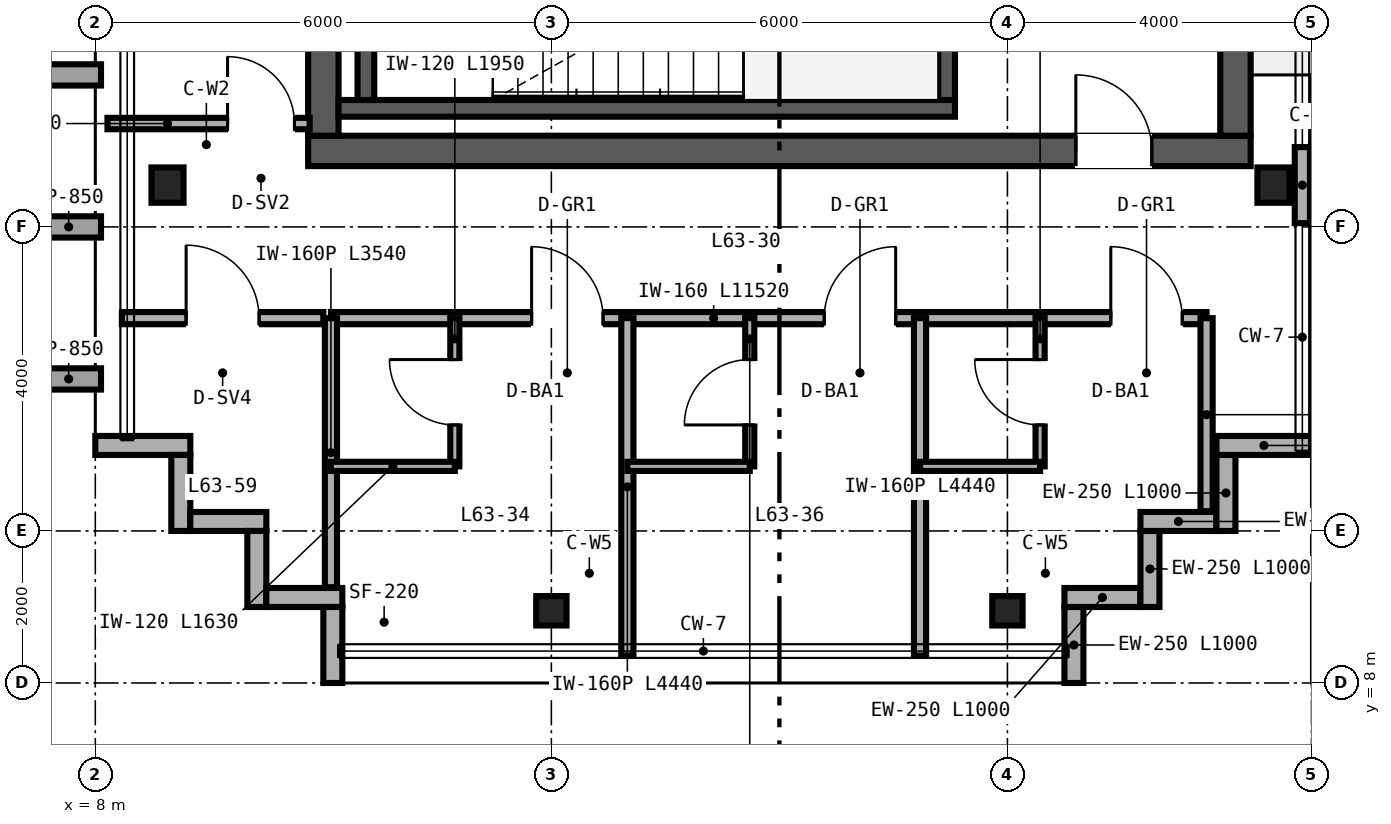
"""IFC4 building model, lengths in metres.
Left out: names, types, materials, properties, quantities, classifications, styles, units other than length and angle.
Written with IfcOpenShell. Run it as: python <this file> out.ifc"""

import sys

from ifc_helpers import new_model, si_unit, direction, frame, frame_2d, origin, origin_2d, place, context, subcontext, project, spatial, rectangle, i_section, extrude, source, transform, mapped, element, fill, save


model = new_model("IFC4")
c1 = context("Model", 3, precision=1e-05, world=origin(), true_north=direction((0.0, 1.0)))
c2 = subcontext(c1, "Body", "Model", "MODEL_VIEW")
j1 = project(units=[si_unit("LENGTHUNIT", "METRE"), si_unit("PLANEANGLEUNIT", "RADIAN")], contexts=[c1])
p1 = place(None, origin())
s1 = spatial("IfcSite", under=j1, at=p1, CompositionType="ELEMENT")
p2 = place(p1, origin())
s2 = spatial("IfcBuilding", under=s1, at=p2, CompositionType="ELEMENT")
p3 = place(p2, frame((0.0, 0.0, 250.8)))
s3 = spatial("IfcBuildingStorey", under=s2, at=p3, CompositionType="ELEMENT", Elevation=250.8)
p4 = place(p3, frame((10.8, 15.0, 0.0), z_axis=(0.0, 0.0, 1.0), x_axis=(1.0, 0.0, 0.0)))
e1 = element("IfcWall", 1, at=p4, inside=s3, PredefinedType="SHEAR", context=c2, shape_type="SweptSolid", body=[
    extrude(rectangle(XDim=12.4, YDim=0.4, at=frame_2d((6.2, 0.0))), origin(), (0.0, 0.0, 1.0), 3.38),
])
p5 = place(p4, frame((10.1, 0.0, 0.0)))
e2 = element("IfcOpeningElement", 2, at=p5, cuts=e1, PredefinedType="OPENING", context=c2, shape_type="SweptSolid", body=[
    extrude(rectangle(XDim=1.0, YDim=2.15, at=frame_2d((0.5, 1.075))), frame((0.0, 0.21, 0.0), z_axis=(0.0, -1.0, 0.0), x_axis=(1.0, 0.0, 0.0)), (0.0, 0.0, 1.0), 0.42),
])
for number, where, z_axis, x_axis in (
    (3, (11.0, 15.2, 0.0), (0.0, 0.0, 1.0), (0.0, 1.0, 0.0)),
    (4, (23.0, 15.2, 0.0), (0.0, 0.0, 1.0), (0.0, 1.0, 0.0)),
):
    element("IfcWall", number, at=place(p3, frame(where, z_axis=z_axis, x_axis=x_axis)), inside=s3, PredefinedType="SHEAR", context=c2, shape_type="SweptSolid", body=[
        extrude(rectangle(XDim=21.6, YDim=0.4, at=frame_2d((10.8, 0.0))), origin(), (0.0, 0.0, 1.0), 3.38),
    ])
p6 = place(p3, frame((11.2, 15.56, 0.0), z_axis=(0.0, 0.0, 1.0), x_axis=(1.0, 0.0, 0.0)))
e5 = element("IfcWall", 5, at=p6, inside=s3, PredefinedType="SHEAR", context=c2, shape_type="SweptSolid", body=[
    extrude(rectangle(XDim=8.11, YDim=0.22, at=frame_2d((4.055, 0.0))), origin(), (0.0, 0.0, 1.0), 3.4),
])
for number, where, z_axis, x_axis in (
    (6, (11.56, 15.67, 0.0), (0.0, 0.0, 1.0), (0.0, 1.0, 0.0)),
    (7, (19.2, 15.67, 0.0), (0.0, 0.0, 1.0), (0.0, 1.0, 0.0)),
):
    element("IfcWall", number, at=place(p3, frame(where, z_axis=z_axis, x_axis=x_axis)), inside=s3, PredefinedType="SHEAR", context=c2, shape_type="SweptSolid", body=[
        extrude(rectangle(XDim=3.28, YDim=0.22, at=frame_2d((1.64, 0.0))), origin(), (0.0, 0.0, 1.0), 3.4),
    ])
m1 = source(origin(), c2, "Body", "SweptSolid", [
    extrude(i_section(OverallWidth=0.422, OverallDepth=0.465, WebThickness=0.045, FlangeThickness=0.073, FilletRadius=0.025, at=origin_2d()), origin(), (0.0, 0.0, 1.0), 3.38),
])
for number, where, z_axis, x_axis in (
    (8, (8.95, 14.55, 0.0), (0.0, 0.0, 1.0), (1.0, 0.0, 0.0)),
    (9, (23.5, 14.55, 0.0), (0.0, 0.0, 1.0), (1.0, 0.0, 0.0)),
):
    element("IfcColumn", number, at=place(p3, frame(where, z_axis=z_axis, x_axis=x_axis)), inside=s3, PredefinedType="COLUMN", context=c2, shape_type="MappedRepresentation", body=[
        mapped(m1, transform((0.0, 0.0, 0.0), scale=1.0)),
    ])
m2 = source(origin(), c2, "Body", "SweptSolid", [
    extrude(i_section(OverallWidth=0.399, OverallDepth=0.387, WebThickness=0.021, FlangeThickness=0.033, FilletRadius=0.025, at=origin_2d()), origin(), (0.0, 0.0, 1.0), 3.38),
])
for number, where, z_axis, x_axis in (
    (10, (14.0, 8.95, 0.0), (0.0, 0.0, 1.0), (1.0, 0.0, 0.0)),
    (11, (20.0, 8.95, 0.0), (0.0, 0.0, 1.0), (1.0, 0.0, 0.0)),
):
    element("IfcColumn", number, at=place(p3, frame(where, z_axis=z_axis, x_axis=x_axis)), inside=s3, PredefinedType="COLUMN", context=c2, shape_type="MappedRepresentation", body=[
        mapped(m2, transform((0.0, 0.0, 0.0), scale=1.0)),
    ])
for number, where, z_axis, x_axis in (
    (12, (20.875, 8.0, 0.0), (0.0, 0.0, 1.0), (0.0, 1.0, 0.0)),
    (13, (20.75, 9.125, 0.0), (0.0, 0.0, 1.0), (1.0, 0.0, 0.0)),
    (14, (21.875, 9.0, 0.0), (0.0, 0.0, 1.0), (0.0, 1.0, 0.0)),
    (15, (21.75, 10.125, 0.0), (0.0, 0.0, 1.0), (1.0, 0.0, 0.0)),
    (16, (22.875, 10.0, 0.0), (0.0, 0.0, 1.0), (0.0, 1.0, 0.0)),
):
    element("IfcWall", number, at=place(p3, frame(where, z_axis=z_axis, x_axis=x_axis)), inside=s3, PredefinedType="SOLIDWALL", context=c2, shape_type="SweptSolid", body=[
        extrude(rectangle(XDim=1.0, YDim=0.25, at=frame_2d((0.5, 0.0))), origin(), (0.0, 0.0, 1.0), 3.38),
    ])
for number, where, z_axis, x_axis in (
    (17, (22.75, 11.125, 0.0), (0.0, 0.0, 1.0), (1.0, 0.0, 0.0)),
    (18, (8.0, 11.125, 0.0), (0.0, 0.0, 1.0), (1.0, 0.0, 0.0)),
):
    element("IfcWall", number, at=place(p3, frame(where, z_axis=z_axis, x_axis=x_axis)), inside=s3, PredefinedType="SOLIDWALL", context=c2, shape_type="SweptSolid", body=[
        extrude(rectangle(XDim=1.25, YDim=0.25, at=frame_2d((0.625, 0.0))), origin(), (0.0, 0.0, 1.0), 3.38),
    ])
for number, where, z_axis, x_axis in (
    (19, (9.125, 11.0, 0.0), (0.0, 0.0, 1.0), (0.0, -1.0, 0.0)),
    (20, (9.25, 10.125, 0.0), (0.0, 0.0, 1.0), (1.0, 0.0, 0.0)),
    (21, (10.125, 10.0, 0.0), (0.0, 0.0, 1.0), (0.0, -1.0, 0.0)),
    (22, (10.25, 9.125, 0.0), (0.0, 0.0, 1.0), (1.0, 0.0, 0.0)),
    (23, (11.125, 9.0, 0.0), (0.0, 0.0, 1.0), (0.0, -1.0, 0.0)),
):
    element("IfcWall", number, at=place(p3, frame(where, z_axis=z_axis, x_axis=x_axis)), inside=s3, PredefinedType="SOLIDWALL", context=c2, shape_type="SweptSolid", body=[
        extrude(rectangle(XDim=1.0, YDim=0.25, at=frame_2d((0.5, 0.0))), origin(), (0.0, 0.0, 1.0), 3.38),
    ])
p7 = place(p3, frame((23.88, 14.05, 0.0), z_axis=(0.0, 0.0, 1.0), x_axis=(0.0, 1.0, 0.0)))
e24 = element("IfcWall", 24, at=p7, inside=s3, PredefinedType="PARAPET", context=c2, shape_type="SweptSolid", body=[
    extrude(rectangle(XDim=1.0, YDim=0.2, at=frame_2d((0.5, 0.0))), origin(), (0.0, 0.0, 1.0), 3.38),
])
p8 = place(p3, frame((11.1, 12.8, 0.0), z_axis=(0.0, 0.0, 1.0), x_axis=(1.0, 0.0, 0.0)))
e25 = element("IfcWall", 25, at=p8, inside=s3, PredefinedType="PARTITIONING", context=c2, shape_type="SweptSolid", body=[
    extrude(rectangle(XDim=11.52, YDim=0.16, at=frame_2d((5.76, 0.0))), origin(), (0.0, 0.0, 1.0), 3.38),
])
p9 = place(p8, frame((2.64, 0.0, 0.0)))
e26 = element("IfcOpeningElement", 26, at=p9, cuts=e25, PredefinedType="OPENING", context=c2, shape_type="SweptSolid", body=[
    extrude(rectangle(XDim=0.94, YDim=2.15, at=frame_2d((0.47, 1.075))), frame((0.0, 0.09, 0.0), z_axis=(0.0, -1.0, 0.0), x_axis=(1.0, 0.0, 0.0)), (0.0, 0.0, 1.0), 0.18),
])
p10 = place(p8, frame((6.49, 0.0, 0.0)))
e27 = element("IfcOpeningElement", 27, at=p10, cuts=e25, PredefinedType="OPENING", context=c2, shape_type="SweptSolid", body=[
    extrude(rectangle(XDim=0.94, YDim=2.15, at=frame_2d((0.47, 1.075))), frame((0.0, 0.09, 0.0), z_axis=(0.0, -1.0, 0.0), x_axis=(1.0, 0.0, 0.0)), (0.0, 0.0, 1.0), 0.18),
])
p11 = place(p8, frame((10.26, 0.0, 0.0)))
e28 = element("IfcOpeningElement", 28, at=p11, cuts=e25, PredefinedType="OPENING", context=c2, shape_type="SweptSolid", body=[
    extrude(rectangle(XDim=0.94, YDim=2.15, at=frame_2d((0.47, 1.075))), frame((0.0, 0.09, 0.0), z_axis=(0.0, -1.0, 0.0), x_axis=(1.0, 0.0, 0.0)), (0.0, 0.0, 1.0), 0.18),
])
p12 = place(p3, frame((11.1, 9.26, 0.0), z_axis=(0.0, 0.0, 1.0), x_axis=(0.0, 1.0, 0.0)))
e29 = element("IfcWall", 29, at=p12, inside=s3, PredefinedType="PARTITIONING", context=c2, shape_type="SweptSolid", body=[
    extrude(rectangle(XDim=3.54, YDim=0.16, at=frame_2d((1.77, 0.0))), origin(), (0.0, 0.0, 1.0), 3.38),
])
p13 = place(p3, frame((22.62, 10.26, 0.0), z_axis=(0.0, 0.0, 1.0), x_axis=(0.0, 1.0, 0.0)))
e30 = element("IfcWall", 30, at=p13, inside=s3, PredefinedType="PARTITIONING", context=c2, shape_type="SweptSolid", body=[
    extrude(rectangle(XDim=2.54, YDim=0.16, at=frame_2d((1.27, 0.0))), origin(), (0.0, 0.0, 1.0), 3.38),
])
p14 = place(p3, frame((15.0, 8.36, 0.0), z_axis=(0.0, 0.0, 1.0), x_axis=(0.0, 1.0, 0.0)))
e31 = element("IfcWall", 31, at=p14, inside=s3, PredefinedType="PARTITIONING", context=c2, shape_type="SweptSolid", body=[
    extrude(rectangle(XDim=4.44, YDim=0.16, at=frame_2d((2.22, 0.0))), origin(), (0.0, 0.0, 1.0), 2.687),
])
p15 = place(p3, frame((12.73, 10.85, 0.0), z_axis=(0.0, 0.0, 1.0), x_axis=(0.0, 1.0, 0.0)))
e32 = element("IfcWall", 32, at=p15, inside=s3, PredefinedType="PARTITIONING", context=c2, shape_type="SweptSolid", body=[
    extrude(rectangle(XDim=1.95, YDim=0.12, at=frame_2d((0.975, 0.0))), origin(), (0.0, 0.0, 1.0), 3.38),
])
p16 = place(p15, frame((0.545, 0.0, 0.0)))
e33 = element("IfcOpeningElement", 33, at=p16, cuts=e32, PredefinedType="OPENING", context=c2, shape_type="SweptSolid", body=[
    extrude(rectangle(XDim=0.86, YDim=2.1, at=frame_2d((0.43, 1.05))), frame((0.0, 0.07, 0.0), z_axis=(0.0, -1.0, 0.0), x_axis=(1.0, 0.0, 0.0)), (0.0, 0.0, 1.0), 0.14),
])
p17 = place(p3, frame((11.1, 10.85, 0.0), z_axis=(0.0, 0.0, 1.0), x_axis=(1.0, 0.0, 0.0)))
e34 = element("IfcWall", 34, at=p17, inside=s3, PredefinedType="PARTITIONING", context=c2, shape_type="SweptSolid", body=[
    extrude(rectangle(XDim=1.63, YDim=0.12, at=frame_2d((0.815, 0.0))), origin(), (0.0, 0.0, 1.0), 3.38),
])
p18 = place(p3, frame((18.85, 8.36, 0.0), z_axis=(0.0, 0.0, 1.0), x_axis=(0.0, 1.0, 0.0)))
e35 = element("IfcWall", 35, at=p18, inside=s3, PredefinedType="PARTITIONING", context=c2, shape_type="SweptSolid", body=[
    extrude(rectangle(XDim=4.44, YDim=0.16, at=frame_2d((2.22, 0.0))), origin(), (0.0, 0.0, 1.0), 2.687),
])
p19 = place(p3, frame((16.61, 10.85, 0.0), z_axis=(0.0, 0.0, 1.0), x_axis=(0.0, 1.0, 0.0)))
e36 = element("IfcWall", 36, at=p19, inside=s3, PredefinedType="PARTITIONING", context=c2, shape_type="SweptSolid", body=[
    extrude(rectangle(XDim=1.95, YDim=0.12, at=frame_2d((0.975, 0.0))), origin(), (0.0, 0.0, 1.0), 3.38),
])
p20 = place(p19, frame((0.545, 0.0, 0.0)))
e37 = element("IfcOpeningElement", 37, at=p20, cuts=e36, PredefinedType="OPENING", context=c2, shape_type="SweptSolid", body=[
    extrude(rectangle(XDim=0.86, YDim=2.1, at=frame_2d((0.43, 1.05))), frame((0.0, 0.07, 0.0), z_axis=(0.0, -1.0, 0.0), x_axis=(1.0, 0.0, 0.0)), (0.0, 0.0, 1.0), 0.14),
])
p21 = place(p3, frame((15.0, 10.85, 0.0), z_axis=(0.0, 0.0, 1.0), x_axis=(1.0, 0.0, 0.0)))
e38 = element("IfcWall", 38, at=p21, inside=s3, PredefinedType="PARTITIONING", context=c2, shape_type="SweptSolid", body=[
    extrude(rectangle(XDim=1.61, YDim=0.12, at=frame_2d((0.805, 0.0))), origin(), (0.0, 0.0, 1.0), 3.38),
])
p22 = place(p3, frame((20.43, 10.85, 0.0), z_axis=(0.0, 0.0, 1.0), x_axis=(0.0, 1.0, 0.0)))
e39 = element("IfcWall", 39, at=p22, inside=s3, PredefinedType="PARTITIONING", context=c2, shape_type="SweptSolid", body=[
    extrude(rectangle(XDim=1.95, YDim=0.12, at=frame_2d((0.975, 0.0))), origin(), (0.0, 0.0, 1.0), 3.38),
])
p23 = place(p22, frame((0.545, 0.0, 0.0)))
e40 = element("IfcOpeningElement", 40, at=p23, cuts=e39, PredefinedType="OPENING", context=c2, shape_type="SweptSolid", body=[
    extrude(rectangle(XDim=0.86, YDim=2.1, at=frame_2d((0.43, 1.05))), frame((0.0, 0.07, 0.0), z_axis=(0.0, -1.0, 0.0), x_axis=(1.0, 0.0, 0.0)), (0.0, 0.0, 1.0), 0.14),
])
p24 = place(p3, frame((18.85, 10.85, 0.0), z_axis=(0.0, 0.0, 1.0), x_axis=(1.0, 0.0, 0.0)))
e41 = element("IfcWall", 41, at=p24, inside=s3, PredefinedType="PARTITIONING", context=c2, shape_type="SweptSolid", body=[
    extrude(rectangle(XDim=1.58, YDim=0.12, at=frame_2d((0.79, 0.0))), origin(), (0.0, 0.0, 1.0), 3.38),
])
p25 = place(p3, frame((8.16, 15.36, 0.0), z_axis=(0.0, 0.0, 1.0), x_axis=(1.0, 0.0, 0.0)))
e42 = element("IfcWall", 42, at=p25, inside=s3, PredefinedType="PARTITIONING", context=c2, shape_type="SweptSolid", body=[
    extrude(rectangle(XDim=2.66, YDim=0.15, at=frame_2d((1.33, 0.0))), origin(), (0.0, 0.0, 1.0), 2.601),
])
p26 = place(p25, frame((1.58, 0.0, 0.0)))
e43 = element("IfcOpeningElement", 43, at=p26, cuts=e42, PredefinedType="OPENING", context=c2, shape_type="SweptSolid", body=[
    extrude(rectangle(XDim=0.88, YDim=2.15, at=frame_2d((0.44, 1.075))), frame((0.0, 0.085, 0.0), z_axis=(0.0, -1.0, 0.0), x_axis=(1.0, 0.0, 0.0)), (0.0, 0.0, 1.0), 0.17),
])
p27 = place(p3, frame((8.35, 12.8, 0.0), z_axis=(0.0, 0.0, 1.0), x_axis=(1.0, 0.0, 0.0)))
e44 = element("IfcWall", 44, at=p27, inside=s3, PredefinedType="PARTITIONING", context=c2, shape_type="SweptSolid", body=[
    extrude(rectangle(XDim=2.65, YDim=0.16, at=frame_2d((1.325, 0.0))), origin(), (0.0, 0.0, 1.0), 3.38),
])
p28 = place(p27, frame((0.845, 0.0, 0.0)))
e45 = element("IfcOpeningElement", 45, at=p28, cuts=e44, PredefinedType="OPENING", context=c2, shape_type="SweptSolid", body=[
    extrude(rectangle(XDim=0.96, YDim=2.15, at=frame_2d((0.48, 1.075))), frame((0.0, 0.09, 0.0), z_axis=(0.0, -1.0, 0.0), x_axis=(1.0, 0.0, 0.0)), (0.0, 0.0, 1.0), 0.18),
])
m3 = source(origin(), c2, "Body", "SweptSolid", [
    extrude(rectangle(XDim=1.0, YDim=2.15, at=frame_2d((0.5, 1.075))), frame((0.0, 0.025, 0.0), z_axis=(0.0, -1.0, 0.0), x_axis=(1.0, 0.0, 0.0)), (0.0, 0.0, 1.0), 0.05),
])
p29 = place(p5, origin())
e46 = element("IfcDoor", 46, at=p29, inside=s3, OperationType="SINGLE_SWING_LEFT", PredefinedType="DOOR", context=c2, shape_type="MappedRepresentation", body=[
    mapped(m3, transform((0.0, 0.0, 0.0), scale=1.0)),
])
fill(e2, e46)
m4 = source(origin(), c2, "Body", "SweptSolid", [
    extrude(rectangle(XDim=0.86, YDim=2.1, at=frame_2d((0.43, 1.05))), frame((0.0, 0.025, 0.0), z_axis=(0.0, -1.0, 0.0), x_axis=(1.0, 0.0, 0.0)), (0.0, 0.0, 1.0), 0.05),
])
p30 = place(p16, origin())
e47 = element("IfcDoor", 47, at=p30, inside=s3, OperationType="SINGLE_SWING_RIGHT", PredefinedType="DOOR", context=c2, shape_type="MappedRepresentation", body=[
    mapped(m4, transform((0.0, 0.0, 0.0), scale=1.0)),
])
fill(e33, e47)
p31 = place(p20, origin())
e48 = element("IfcDoor", 48, at=p31, inside=s3, OperationType="SINGLE_SWING_LEFT", PredefinedType="DOOR", context=c2, shape_type="MappedRepresentation", body=[
    mapped(m4, transform((0.0, 0.0, 0.0), scale=1.0)),
])
fill(e37, e48)
p32 = place(p23, origin())
e49 = element("IfcDoor", 49, at=p32, inside=s3, OperationType="SINGLE_SWING_RIGHT", PredefinedType="DOOR", context=c2, shape_type="MappedRepresentation", body=[
    mapped(m4, transform((0.0, 0.0, 0.0), scale=1.0)),
])
fill(e40, e49)
m5 = source(origin(), c2, "Body", "SweptSolid", [
    extrude(rectangle(XDim=0.94, YDim=2.15, at=frame_2d((0.47, 1.075))), frame((0.0, 0.025, 0.0), z_axis=(0.0, -1.0, 0.0), x_axis=(1.0, 0.0, 0.0)), (0.0, 0.0, 1.0), 0.05),
])
p33 = place(p9, origin())
e50 = element("IfcDoor", 50, at=p33, inside=s3, OperationType="SINGLE_SWING_LEFT", PredefinedType="DOOR", context=c2, shape_type="MappedRepresentation", body=[
    mapped(m5, transform((0.0, 0.0, 0.0), scale=1.0)),
])
fill(e26, e50)
p34 = place(p10, origin())
e51 = element("IfcDoor", 51, at=p34, inside=s3, OperationType="SINGLE_SWING_RIGHT", PredefinedType="DOOR", context=c2, shape_type="MappedRepresentation", body=[
    mapped(m5, transform((0.0, 0.0, 0.0), scale=1.0)),
])
fill(e27, e51)
p35 = place(p11, origin())
e52 = element("IfcDoor", 52, at=p35, inside=s3, OperationType="SINGLE_SWING_LEFT", PredefinedType="DOOR", context=c2, shape_type="MappedRepresentation", body=[
    mapped(m5, transform((0.0, 0.0, 0.0), scale=1.0)),
])
fill(e28, e52)
m6 = source(origin(), c2, "Body", "SweptSolid", [
    extrude(rectangle(XDim=0.88, YDim=2.15, at=frame_2d((0.44, 1.075))), frame((0.0, 0.025, 0.0), z_axis=(0.0, -1.0, 0.0), x_axis=(1.0, 0.0, 0.0)), (0.0, 0.0, 1.0), 0.05),
])
p36 = place(p26, origin())
e53 = element("IfcDoor", 53, at=p36, inside=s3, OperationType="SINGLE_SWING_LEFT", PredefinedType="DOOR", context=c2, shape_type="MappedRepresentation", body=[
    mapped(m6, transform((0.0, 0.0, 0.0), scale=1.0)),
])
fill(e43, e53)
m7 = source(origin(), c2, "Body", "SweptSolid", [
    extrude(rectangle(XDim=0.96, YDim=2.15, at=frame_2d((0.48, 1.075))), frame((0.0, 0.025, 0.0), z_axis=(0.0, -1.0, 0.0), x_axis=(1.0, 0.0, 0.0)), (0.0, 0.0, 1.0), 0.05),
])
p37 = place(p28, origin())
e54 = element("IfcDoor", 54, at=p37, inside=s3, OperationType="SINGLE_SWING_LEFT", PredefinedType="DOOR", context=c2, shape_type="MappedRepresentation", body=[
    mapped(m7, transform((0.0, 0.0, 0.0), scale=1.0)),
])
fill(e45, e54)
save(model, sys.argv[1])
